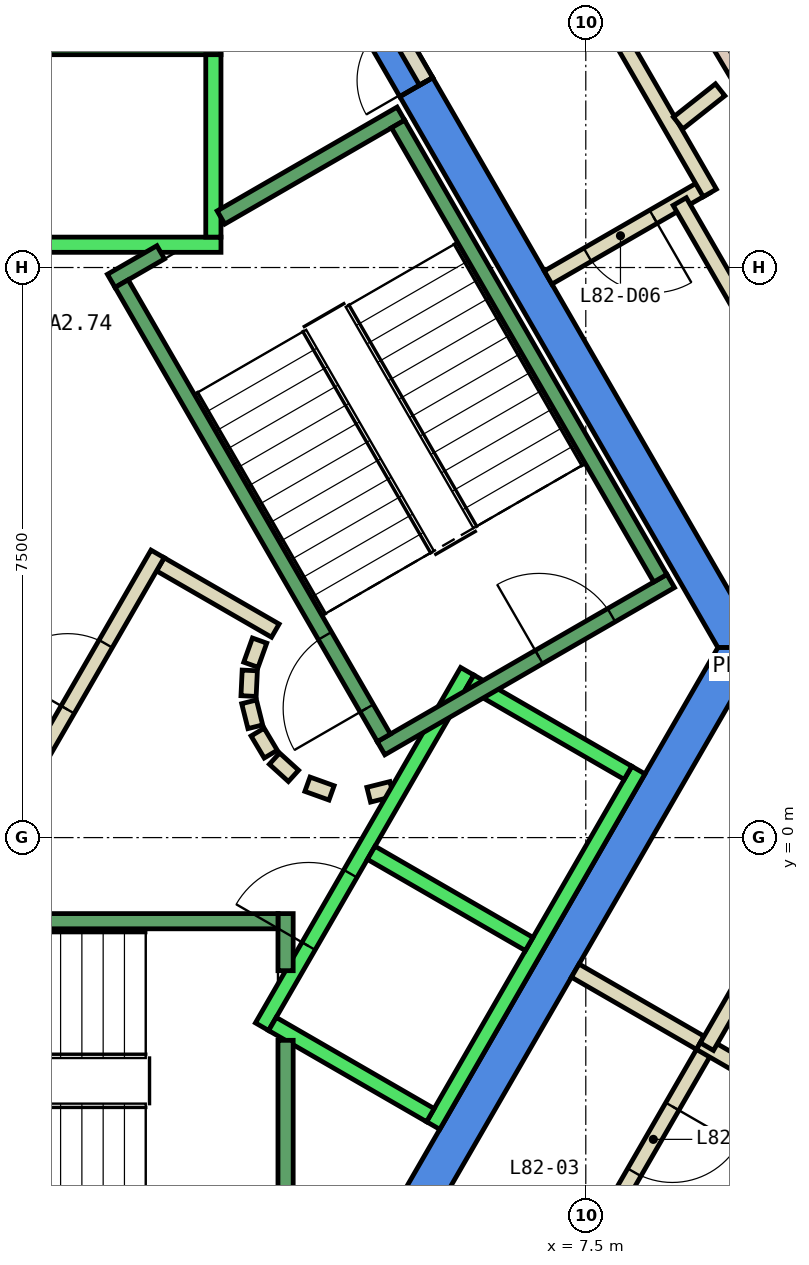
"""IFC4 building model, lengths in metres.
Left out: names, types, materials, properties, quantities, classifications, styles, units other than length and angle.
Written with IfcOpenShell. Run it as: python <this file> out.ifc"""

import sys

from ifc_helpers import new_model, si_unit, direction, frame, frame_2d, origin, place, context, subcontext, project, spatial, polyline, rectangle, outline, extrude, element, fill, save


model = new_model("IFC4")
c1 = context("Model", 3, precision=1e-05, world=origin(), true_north=direction((0.0, 1.0)))
c2 = subcontext(c1, "Body", "Model", "MODEL_VIEW")
j1 = project(units=[si_unit("LENGTHUNIT", "METRE"), si_unit("PLANEANGLEUNIT", "RADIAN")], contexts=[c1])
p1 = place(None, origin())
s1 = spatial("IfcSite", under=j1, at=p1, CompositionType="ELEMENT")
p2 = place(p1, origin())
s2 = spatial("IfcBuilding", under=s1, at=p2, CompositionType="ELEMENT")
p3 = place(p2, frame((0.0, 0.0, 349.4)))
s3 = spatial("IfcBuildingStorey", under=s2, at=p3, CompositionType="ELEMENT", Elevation=349.4)
p4 = place(p3, frame((0.0, 0.0, -0.45)))
e1 = element("IfcWall", 1, at=p4, inside=s3, PredefinedType="SHEAR", context=c2, shape_type="SweptSolid", body=[
    extrude(outline(polyline([(5.486, 9.998), (5.053, 9.748), (9.238, 2.5), (9.815, 2.5), (5.486, 9.998)])), origin(), (0.0, 0.0, 1.0), 4.6),
])
p5 = place(p3, frame((0.0, 0.0, 3.6)))
e2 = element("IfcWall", 2, at=p5, inside=s3, PredefinedType="SHEAR", context=c2, shape_type="SweptSolid", body=[
    extrude(outline(polyline([(5.022, 10.8), (4.677, 10.601), (4.619, 10.5), (5.053, 9.748), (5.486, 9.998), (5.022, 10.8)])), origin(), (0.0, 0.0, 1.0), 0.55),
])
p6 = place(p3, frame((0.0, 0.0, -0.45)))
e3 = element("IfcWall", 3, at=p6, inside=s3, PredefinedType="SHEAR", context=c2, shape_type="SweptSolid", body=[
    extrude(outline(polyline([(4.907, -6.0), (9.815, 2.5), (9.238, 2.5), (4.619, -5.5), (4.907, -6.0)])), origin(), (0.0, 0.0, 1.0), 4.6),
])
p7 = place(p3, frame((11.305, 7.104, 0.0), z_axis=(0.0, 0.0, 1.0), x_axis=(-0.512115331419, 0.858916694055, 0.0)))
e4 = element("IfcWall", 4, at=p7, inside=s3, PredefinedType="STANDARD", context=c2, shape_type="SweptSolid", body=[
    extrude(rectangle(XDim=5.661, YDim=0.3, at=frame_2d((2.83, 0.0))), origin(), (0.0, 0.0, 1.0), 4.15),
])
p8 = place(p7, frame((0.715, 0.0, 0.9)))
e5 = element("IfcOpeningElement", 5, at=p8, cuts=e4, PredefinedType="OPENING", context=c2, shape_type="SweptSolid", body=[
    extrude(rectangle(XDim=1.4, YDim=3.0, at=frame_2d((0.7, 1.5))), frame((0.0, 0.16, 0.0), z_axis=(0.0, -1.0, 0.0), x_axis=(1.0, 0.0, 0.0)), (0.0, 0.0, 1.0), 0.32),
])
p9 = place(p7, frame((3.546, 0.0, 0.9)))
e6 = element("IfcOpeningElement", 6, at=p9, cuts=e4, PredefinedType="OPENING", context=c2, shape_type="SweptSolid", body=[
    extrude(rectangle(XDim=1.4, YDim=3.0, at=frame_2d((0.7, 1.5))), frame((0.0, 0.16, 0.0), z_axis=(0.0, -1.0, 0.0), x_axis=(1.0, 0.0, 0.0)), (0.0, 0.0, 1.0), 0.32),
])
p10 = place(p3, origin())
e7 = element("IfcWall", 7, at=p10, inside=s3, PredefinedType="PARAPET", context=c2, shape_type="SweptSolid", body=[
    extrude(outline(polyline([(12.99, 7.5), (9.22, 13.846), (8.964, 13.69), (12.73, 7.35), (12.99, 7.5)])), origin(), (0.0, 0.0, 1.0), 1.1),
])
p11 = place(p3, frame((1.903, 3.595, 0.0), z_axis=(0.0, 0.0, 1.0), x_axis=(0.866239139897, -0.499629615326, 0.0)))
e8 = element("IfcWall", 8, at=p11, inside=s3, PredefinedType="PARTITIONING", context=c2, shape_type="SweptSolid", body=[
    extrude(rectangle(XDim=1.745, YDim=0.2, at=frame_2d((0.873, 0.0))), origin(), (0.0, 0.0, 1.0), 4.15),
])
p12 = place(p3, frame((3.208, 2.592, 0.0), z_axis=(0.0, 0.0, 1.0), x_axis=(-0.337388820924, -0.941365382578, 0.0)))
e9 = element("IfcWall", 9, at=p12, inside=s3, PredefinedType="PARTITIONING", context=c2, shape_type="SweptSolid", body=[
    extrude(rectangle(XDim=0.338, YDim=0.2, at=frame_2d((0.169, 0.0))), origin(), (0.0, 0.0, 1.0), 4.15),
])
p13 = place(p3, frame((3.079, 2.199, 0.0), z_axis=(0.0, 0.0, 1.0), x_axis=(-0.047771483479, -0.998858290933, 0.0)))
e10 = element("IfcWall", 10, at=p13, inside=s3, PredefinedType="PARTITIONING", context=c2, shape_type="SweptSolid", body=[
    extrude(rectangle(XDim=0.337, YDim=0.2, at=frame_2d((0.169, 0.0))), origin(), (0.0, 0.0, 1.0), 4.15),
])
p14 = place(p3, frame((3.07, 1.786, 0.0), z_axis=(0.0, 0.0, 1.0), x_axis=(0.242705583207, -0.970099994784, 0.0)))
e11 = element("IfcWall", 11, at=p14, inside=s3, PredefinedType="PARTITIONING", context=c2, shape_type="SweptSolid", body=[
    extrude(rectangle(XDim=0.338, YDim=0.2, at=frame_2d((0.169, 0.0))), origin(), (0.0, 0.0, 1.0), 4.15),
])
for number, where, z_axis, x_axis in (
    (12, (3.182, 1.388, 0.0), (0.0, 0.0, 1.0), (0.512, -0.859, 0.0)),
    (13, (3.404, 1.039, 0.0), (0.0, 0.0, 1.0), (0.74, -0.672, 0.0)),
):
    element("IfcWall", number, at=place(p3, frame(where, z_axis=z_axis, x_axis=x_axis)), inside=s3, PredefinedType="PARTITIONING", context=c2, shape_type="SweptSolid", body=[
        extrude(rectangle(XDim=0.338, YDim=0.2, at=frame_2d((0.169, 0.0))), origin(), (0.0, 0.0, 1.0), 4.15),
    ])
p15 = place(p3, frame((3.838, 0.702, 0.0), z_axis=(0.0, 0.0, 1.0), x_axis=(0.941035081519, -0.338308993895, 0.0)))
e14 = element("IfcWall", 14, at=p15, inside=s3, PredefinedType="PARTITIONING", context=c2, shape_type="SweptSolid", body=[
    extrude(rectangle(XDim=0.337, YDim=0.2, at=frame_2d((0.168, 0.0))), origin(), (0.0, 0.0, 1.0), 4.15),
])
p16 = place(p3, frame((4.644, 0.564, 0.0), z_axis=(0.0, 0.0, 1.0), x_axis=(0.970004408322, 0.243087325534, 0.0)))
e15 = element("IfcWall", 15, at=p16, inside=s3, PredefinedType="PARTITIONING", context=c2, shape_type="SweptSolid", body=[
    extrude(rectangle(XDim=0.312, YDim=0.2, at=frame_2d((0.156, 0.0))), origin(), (0.0, 0.0, 1.0), 4.15),
])
p17 = place(p3, frame((0.05, 0.587, 0.0), z_axis=(0.0, 0.0, 1.0), x_axis=(0.500028932171, 0.866008699143, 0.0)))
e16 = element("IfcWall", 16, at=p17, inside=s3, PredefinedType="PARTITIONING", context=c2, shape_type="SweptSolid", body=[
    extrude(rectangle(XDim=3.632, YDim=0.2, at=frame_2d((1.816, 0.0))), origin(), (0.0, 0.0, 1.0), 4.15),
])
p18 = place(p17, frame((1.266, 0.0, 0.0)))
e17 = element("IfcOpeningElement", 17, at=p18, cuts=e16, PredefinedType="OPENING", context=c2, shape_type="SweptSolid", body=[
    extrude(rectangle(XDim=1.0, YDim=2.1, at=frame_2d((0.5, 1.05))), frame((0.0, 0.11, 0.0), z_axis=(0.0, -1.0, 0.0), x_axis=(1.0, 0.0, 0.0)), (0.0, 0.0, 1.0), 0.22),
])
p19 = place(p3, frame((9.093, -2.75, 0.0), z_axis=(0.0, 0.0, 1.0), x_axis=(-0.500084415177, -0.865976661173, 0.0)))
e18 = element("IfcWall", 18, at=p19, inside=s3, PredefinedType="PARTITIONING", context=c2, shape_type="SweptSolid", body=[
    extrude(rectangle(XDim=3.853, YDim=0.2, at=frame_2d((1.927, 0.0))), origin(), (0.0, 0.0, 1.0), 4.15),
])
p20 = place(p19, frame((0.909, 0.0, 0.0)))
e19 = element("IfcOpeningElement", 19, at=p20, cuts=e18, PredefinedType="OPENING", context=c2, shape_type="SweptSolid", body=[
    extrude(rectangle(XDim=1.0, YDim=2.1, at=frame_2d((0.5, 1.05))), frame((0.0, 0.11, 0.0), z_axis=(0.0, -1.0, 0.0), x_axis=(1.0, 0.0, 0.0)), (0.0, 0.0, 1.0), 0.22),
])
p21 = place(p3, frame((7.361, -1.75, 0.0), z_axis=(0.0, 0.0, 1.0), x_axis=(0.865980106173, -0.500078449558, 0.0)))
e20 = element("IfcWall", 20, at=p21, inside=s3, PredefinedType="PARTITIONING", context=c2, shape_type="SweptSolid", body=[
    extrude(rectangle(XDim=1.9, YDim=0.2, at=frame_2d((0.95, 0.0))), origin(), (0.0, 0.0, 1.0), 4.15),
])
p22 = place(p3, frame((9.006, -2.7, 0.0), z_axis=(0.0, 0.0, 1.0), x_axis=(0.866016483303, -0.500015450408, 0.0)))
e21 = element("IfcWall", 21, at=p22, inside=s3, PredefinedType="PARTITIONING", context=c2, shape_type="SweptSolid", body=[
    extrude(rectangle(XDim=9.978, YDim=0.2, at=frame_2d((4.989, 0.0))), origin(), (0.0, 0.0, 1.0), 4.15),
])
p23 = place(p3, frame((9.082, 8.568, 0.0), z_axis=(0.0, 0.0, 1.0), x_axis=(-0.865955154139, -0.50012165622, 0.0)))
e22 = element("IfcWall", 22, at=p23, inside=s3, PredefinedType="PARTITIONING", context=c2, shape_type="SweptSolid", body=[
    extrude(rectangle(XDim=2.4, YDim=0.2, at=frame_2d((1.2, 0.0))), origin(), (0.0, 0.0, 1.0), 4.15),
])
p24 = place(p23, frame((0.8, 0.0, 0.0)))
e23 = element("IfcOpeningElement", 23, at=p24, cuts=e22, PredefinedType="OPENING", context=c2, shape_type="SweptSolid", body=[
    extrude(rectangle(XDim=1.0, YDim=2.1, at=frame_2d((0.5, 1.05))), frame((0.0, 0.11, 0.0), z_axis=(0.0, -1.0, 0.0), x_axis=(1.0, 0.0, 0.0)), (0.0, 0.0, 1.0), 0.22),
])
p25 = place(p3, frame((7.388, 11.502, 0.0), z_axis=(0.0, 0.0, 1.0), x_axis=(0.499993059066, -0.866029411098, 0.0)))
e24 = element("IfcWall", 24, at=p25, inside=s3, PredefinedType="PARTITIONING", context=c2, shape_type="SweptSolid", body=[
    extrude(rectangle(XDim=3.488, YDim=0.2, at=frame_2d((1.744, 0.0))), origin(), (0.0, 0.0, 1.0), 4.15),
])
p26 = place(p3, frame((8.736, 8.368, 0.0), z_axis=(0.0, 0.0, 1.0), x_axis=(0.499995994493, -0.866027716353, 0.0)))
e25 = element("IfcWall", 25, at=p26, inside=s3, PredefinedType="PARTITIONING", context=c2, shape_type="SweptSolid", body=[
    extrude(rectangle(XDim=6.876, YDim=0.2, at=frame_2d((3.438, 0.0))), origin(), (0.0, 0.0, 1.0), 4.15),
])
p27 = place(p26, frame((5.576, 0.0, 0.0)))
e26 = element("IfcOpeningElement", 26, at=p27, cuts=e25, PredefinedType="OPENING", context=c2, shape_type="SweptSolid", body=[
    extrude(rectangle(XDim=1.0, YDim=2.1, at=frame_2d((0.5, 1.05))), frame((0.0, 0.11, 0.0), z_axis=(0.0, -1.0, 0.0), x_axis=(1.0, 0.0, 0.0)), (0.0, 0.0, 1.0), 0.22),
])
p28 = place(p3, frame((12.074, 2.413, 0.0), z_axis=(0.0, 0.0, 1.0), x_axis=(-0.500006035293, -0.866021919278, 0.0)))
e27 = element("IfcWall", 27, at=p28, inside=s3, PredefinedType="PARTITIONING", context=c2, shape_type="SweptSolid", body=[
    extrude(rectangle(XDim=5.962, YDim=0.2, at=frame_2d((2.981, 0.0))), origin(), (0.0, 0.0, 1.0), 4.15),
])
p29 = place(p3, frame((9.268, 9.838, 0.0), z_axis=(0.0, 0.0, 1.0), x_axis=(-0.784572335163, -0.620037297988, 0.0)))
e28 = element("IfcWall", 28, at=p29, inside=s3, PredefinedType="PARTITIONING", context=c2, shape_type="SweptSolid", body=[
    extrude(rectangle(XDim=0.705, YDim=0.2, at=frame_2d((0.353, 0.0))), origin(), (0.0, 0.0, 1.0), 4.15),
])
p30 = place(p3, frame((5.399, 9.948, 0.0), z_axis=(0.0, 0.0, 1.0), x_axis=(-0.499882215713, 0.866093395895, 0.0)))
e29 = element("IfcWall", 29, at=p30, inside=s3, PredefinedType="PARTITIONING", context=c2, shape_type="SweptSolid", body=[
    extrude(rectangle(XDim=0.926, YDim=0.2, at=frame_2d((0.463, 0.0))), origin(), (0.0, 0.0, 1.0), 2.4),
])
p31 = place(p30, frame((0.017, 0.0, 0.0)))
e30 = element("IfcOpeningElement", 30, at=p31, cuts=e29, PredefinedType="OPENING", context=c2, shape_type="SweptSolid", body=[
    extrude(rectangle(XDim=0.9, YDim=2.1, at=frame_2d((0.45, 1.05))), frame((0.0, 0.11, 0.0), z_axis=(0.0, -1.0, 0.0), x_axis=(1.0, 0.0, 0.0)), (0.0, 0.0, 1.0), 0.22),
])
for number, where, z_axis, x_axis in (
    (31, (2.7, 7.8, 0.0), (0.0, 0.0, 1.0), (-1.0, 0.0, 0.0)),
    (32, (2.7, 10.4, 0.0), (0.0, 0.0, 1.0), (-1.0, 0.0, 0.0)),
):
    element("IfcWall", number, at=place(p3, frame(where, z_axis=z_axis, x_axis=x_axis)), inside=s3, PredefinedType="STANDARD", context=c2, shape_type="SweptSolid", body=[
        extrude(rectangle(XDim=5.4, YDim=0.2, at=frame_2d((2.7, 0.0))), origin(), (0.0, 0.0, 1.0), 4.15),
    ])
p32 = place(p3, frame((2.6, 7.9, 0.0), z_axis=(0.0, 0.0, 1.0), x_axis=(0.0, 1.0, 0.0)))
e33 = element("IfcWall", 33, at=p32, inside=s3, PredefinedType="STANDARD", context=c2, shape_type="SweptSolid", body=[
    extrude(rectangle(XDim=2.4, YDim=0.2, at=frame_2d((1.2, 0.0))), origin(), (0.0, 0.0, 1.0), 4.15),
])
p33 = place(p3, frame((3.24, -2.488, 0.0), z_axis=(0.0, 0.0, 1.0), x_axis=(0.500034260056, 0.866005622828, 0.0)))
e34 = element("IfcWall", 34, at=p33, inside=s3, PredefinedType="STANDARD", context=c2, shape_type="SweptSolid", body=[
    extrude(rectangle(XDim=5.399, YDim=0.2, at=frame_2d((2.7, 0.0))), origin(), (0.0, 0.0, 1.0), 4.15),
])
p34 = place(p33, frame((1.225, 0.0, 0.0)))
e35 = element("IfcOpeningElement", 35, at=p34, cuts=e34, PredefinedType="OPENING", context=c2, shape_type="SweptSolid", body=[
    extrude(rectangle(XDim=1.1, YDim=2.1, at=frame_2d((0.55, 1.05))), frame((0.0, 0.11, 0.0), z_axis=(0.0, -1.0, 0.0), x_axis=(1.0, 0.0, 0.0)), (0.0, 0.0, 1.0), 0.22),
])
p35 = place(p3, frame((5.492, -3.788, 0.0), z_axis=(0.0, 0.0, 1.0), x_axis=(0.500034260056, 0.866005622828, 0.0)))
e36 = element("IfcWall", 36, at=p35, inside=s3, PredefinedType="STANDARD", context=c2, shape_type="SweptSolid", body=[
    extrude(rectangle(XDim=5.399, YDim=0.2, at=frame_2d((2.7, 0.0))), origin(), (0.0, 0.0, 1.0), 4.15),
])
p36 = place(p3, frame((3.377, -2.452, 0.0), z_axis=(0.0, 0.0, 1.0), x_axis=(0.865955154139, -0.50012165622, 0.0)))
e37 = element("IfcWall", 37, at=p36, inside=s3, PredefinedType="STANDARD", context=c2, shape_type="SweptSolid", body=[
    extrude(rectangle(XDim=2.4, YDim=0.2, at=frame_2d((1.2, 0.0))), origin(), (0.0, 0.0, 1.0), 4.15),
])
for number, where, z_axis, x_axis in (
    (38, (4.677, -0.2, 0.0), (0.0, 0.0, 1.0), (0.866, -0.5, 0.0)),
    (39, (5.977, 2.052, 0.0), (0.0, 0.0, 1.0), (0.866, -0.5, 0.0)),
):
    element("IfcWall", number, at=place(p3, frame(where, z_axis=z_axis, x_axis=x_axis)), inside=s3, PredefinedType="STANDARD", context=c2, shape_type="SweptSolid", body=[
        extrude(rectangle(XDim=2.399, YDim=0.2, at=frame_2d((1.2, 0.0))), origin(), (0.0, 0.0, 1.0), 4.15),
    ])
p37 = place(p3, frame((3.55, -2.667, 0.0), z_axis=(0.0, 0.0, 1.0), x_axis=(0.0, -1.0, 0.0)))
e40 = element("IfcWall", 40, at=p37, inside=s3, PredefinedType="STANDARD", context=c2, shape_type="SweptSolid", body=[
    extrude(rectangle(XDim=2.733, YDim=0.2, at=frame_2d((1.366, 0.0))), origin(), (0.0, 0.0, 1.0), 4.15),
])
p38 = place(p3, frame((3.55, -1.0, 0.0), z_axis=(0.0, 0.0, 1.0), x_axis=(0.0, -1.0, 0.0)))
e41 = element("IfcWall", 41, at=p38, inside=s3, PredefinedType="STANDARD", context=c2, shape_type="SweptSolid", body=[
    extrude(rectangle(XDim=0.751, YDim=0.2, at=frame_2d((0.375, 0.0))), origin(), (0.0, 0.0, 1.0), 4.15),
])
p39 = place(p3, frame((-3.45, -1.1, 0.0), z_axis=(0.0, 0.0, 1.0), x_axis=(1.0, 0.0, 0.0)))
e42 = element("IfcWall", 42, at=p39, inside=s3, PredefinedType="STANDARD", context=c2, shape_type="SweptSolid", body=[
    extrude(rectangle(XDim=6.9, YDim=0.2, at=frame_2d((3.45, 0.0))), origin(), (0.0, 0.0, 1.0), 4.15),
])
p40 = place(p39, frame((0.45, 0.0, 0.0)))
e43 = element("IfcOpeningElement", 43, at=p40, cuts=e42, PredefinedType="OPENING", context=c2, shape_type="SweptSolid", body=[
    extrude(rectangle(XDim=1.1, YDim=2.2, at=frame_2d((0.55, 1.1))), frame((0.0, 0.11, 0.0), z_axis=(0.0, -1.0, 0.0), x_axis=(1.0, 0.0, 0.0)), (0.0, 0.0, 1.0), 0.22),
])
p41 = place(p3, frame((4.806, 1.176, 0.0), z_axis=(0.0, 0.0, 1.0), x_axis=(0.866059941101, 0.499940174841, 0.0)))
e44 = element("IfcWall", 44, at=p41, inside=s3, PredefinedType="STANDARD", context=c2, shape_type="SweptSolid", body=[
    extrude(rectangle(XDim=4.4, YDim=0.2, at=frame_2d((2.2, 0.0))), origin(), (0.0, 0.0, 1.0), 4.15),
])
p42 = place(p41, frame((2.4, 0.0, 0.0)))
e45 = element("IfcOpeningElement", 45, at=p42, cuts=e44, PredefinedType="OPENING", context=c2, shape_type="SweptSolid", body=[
    extrude(rectangle(XDim=1.1, YDim=2.2, at=frame_2d((0.55, 1.1))), frame((0.0, 0.11, 0.0), z_axis=(0.0, -1.0, 0.0), x_axis=(1.0, 0.0, 0.0)), (0.0, 0.0, 1.0), 0.22),
])
p43 = place(p3, frame((2.7, 8.158, 0.0), z_axis=(0.0, 0.0, 1.0), x_axis=(0.86611865017, 0.499838457731, 0.0)))
e46 = element("IfcWall", 46, at=p43, inside=s3, PredefinedType="STANDARD", context=c2, shape_type="SweptSolid", body=[
    extrude(rectangle(XDim=2.733, YDim=0.2, at=frame_2d((1.366, 0.0))), origin(), (0.0, 0.0, 1.0), 4.15),
])
p44 = place(p3, frame((1.256, 7.324, 0.0), z_axis=(0.0, 0.0, 1.0), x_axis=(0.865915093549, 0.500191014278, 0.0)))
e47 = element("IfcWall", 47, at=p44, inside=s3, PredefinedType="STANDARD", context=c2, shape_type="SweptSolid", body=[
    extrude(rectangle(XDim=0.752, YDim=0.2, at=frame_2d((0.376, 0.0))), origin(), (0.0, 0.0, 1.0), 4.15),
])
p45 = place(p3, frame((4.843, 1.312, 0.0), z_axis=(0.0, 0.0, 1.0), x_axis=(-0.499963383562, 0.866046543262, 0.0)))
e48 = element("IfcWall", 48, at=p45, inside=s3, PredefinedType="STANDARD", context=c2, shape_type="SweptSolid", body=[
    extrude(rectangle(XDim=6.9, YDim=0.2, at=frame_2d((3.45, 0.0))), origin(), (0.0, 0.0, 1.0), 4.15),
])
p46 = place(p45, frame((0.45, 0.0, 0.0)))
e49 = element("IfcOpeningElement", 49, at=p46, cuts=e48, PredefinedType="OPENING", context=c2, shape_type="SweptSolid", body=[
    extrude(rectangle(XDim=1.1, YDim=2.2, at=frame_2d((0.55, 1.1))), frame((0.0, 0.11, 0.0), z_axis=(0.0, -1.0, 0.0), x_axis=(1.0, 0.0, 0.0)), (0.0, 0.0, 1.0), 0.22),
])
p47 = place(p3, frame((8.48, 3.412, 0.0), z_axis=(0.0, 0.0, 1.0), x_axis=(-0.499978703459, 0.866037698999, 0.0)))
e50 = element("IfcWall", 50, at=p47, inside=s3, PredefinedType="STANDARD", context=c2, shape_type="SweptSolid", body=[
    extrude(rectangle(XDim=6.9, YDim=0.2, at=frame_2d((3.45, 0.0))), origin(), (0.0, 0.0, 1.0), 4.15),
])
p48 = place(p9, origin())
e51 = element("IfcWindow", 51, at=p48, inside=s3, PartitioningType="SINGLE_PANEL", PredefinedType="WINDOW", context=c2, shape_type="SweptSolid", body=[
    extrude(rectangle(XDim=1.4, YDim=3.0, at=frame_2d((0.7, 1.5))), frame((0.0, 0.03, 0.0), z_axis=(0.0, -1.0, 0.0), x_axis=(1.0, 0.0, 0.0)), (0.0, 0.0, 1.0), 0.06),
])
fill(e6, e51)
p49 = place(p20, origin())
e52 = element("IfcDoor", 52, at=p49, inside=s3, OperationType="SINGLE_SWING_LEFT", PredefinedType="DOOR", context=c2, shape_type="SweptSolid", body=[
    extrude(rectangle(XDim=1.0, YDim=2.1, at=frame_2d((0.5, 1.05))), frame((0.0, 0.025, 0.0), z_axis=(0.0, -1.0, 0.0), x_axis=(1.0, 0.0, 0.0)), (0.0, 0.0, 1.0), 0.05),
])
fill(e19, e52)
p50 = place(p24, origin())
e53 = element("IfcDoor", 53, at=p50, inside=s3, OperationType="SINGLE_SWING_LEFT", PredefinedType="DOOR", context=c2, shape_type="SweptSolid", body=[
    extrude(rectangle(XDim=1.0, YDim=2.1, at=frame_2d((0.5, 1.05))), frame((0.0, 0.025, 0.0), z_axis=(0.0, -1.0, 0.0), x_axis=(1.0, 0.0, 0.0)), (0.0, 0.0, 1.0), 0.05),
])
fill(e23, e53)
p51 = place(p18, origin())
e54 = element("IfcDoor", 54, at=p51, inside=s3, OperationType="SINGLE_SWING_RIGHT", PredefinedType="DOOR", context=c2, shape_type="SweptSolid", body=[
    extrude(rectangle(XDim=1.0, YDim=2.1, at=frame_2d((0.5, 1.05))), frame((0.0, 0.025, 0.0), z_axis=(0.0, -1.0, 0.0), x_axis=(1.0, 0.0, 0.0)), (0.0, 0.0, 1.0), 0.05),
])
fill(e17, e54)
p52 = place(p31, origin())
e55 = element("IfcDoor", 55, at=p52, inside=s3, OperationType="SINGLE_SWING_LEFT", PredefinedType="DOOR", context=c2, shape_type="SweptSolid", body=[
    extrude(rectangle(XDim=0.9, YDim=2.1, at=frame_2d((0.45, 1.05))), frame((0.0, 0.025, 0.0), z_axis=(0.0, -1.0, 0.0), x_axis=(1.0, 0.0, 0.0)), (0.0, 0.0, 1.0), 0.05),
])
fill(e30, e55)
p53 = place(p34, origin())
e56 = element("IfcDoor", 56, at=p53, inside=s3, OperationType="SLIDING_TO_LEFT", PredefinedType="DOOR", context=c2, shape_type="SweptSolid", body=[
    extrude(rectangle(XDim=1.1, YDim=2.1, at=frame_2d((0.55, 1.05))), frame((0.0, 0.025, 0.0), z_axis=(0.0, -1.0, 0.0), x_axis=(1.0, 0.0, 0.0)), (0.0, 0.0, 1.0), 0.05),
])
fill(e35, e56)
p54 = place(p46, origin())
e57 = element("IfcDoor", 57, at=p54, inside=s3, OperationType="SINGLE_SWING_LEFT", PredefinedType="DOOR", context=c2, shape_type="SweptSolid", body=[
    extrude(rectangle(XDim=1.1, YDim=2.2, at=frame_2d((0.55, 1.1))), frame((0.0, 0.025, 0.0), z_axis=(0.0, -1.0, 0.0), x_axis=(1.0, 0.0, 0.0)), (0.0, 0.0, 1.0), 0.05),
])
fill(e49, e57)
p55 = place(p42, origin())
e58 = element("IfcDoor", 58, at=p55, inside=s3, OperationType="SINGLE_SWING_LEFT", PredefinedType="DOOR", context=c2, shape_type="SweptSolid", body=[
    extrude(rectangle(XDim=1.1, YDim=2.2, at=frame_2d((0.55, 1.1))), frame((0.0, 0.025, 0.0), z_axis=(0.0, -1.0, 0.0), x_axis=(1.0, 0.0, 0.0)), (0.0, 0.0, 1.0), 0.05),
])
fill(e45, e58)
save(model, sys.argv[1])
